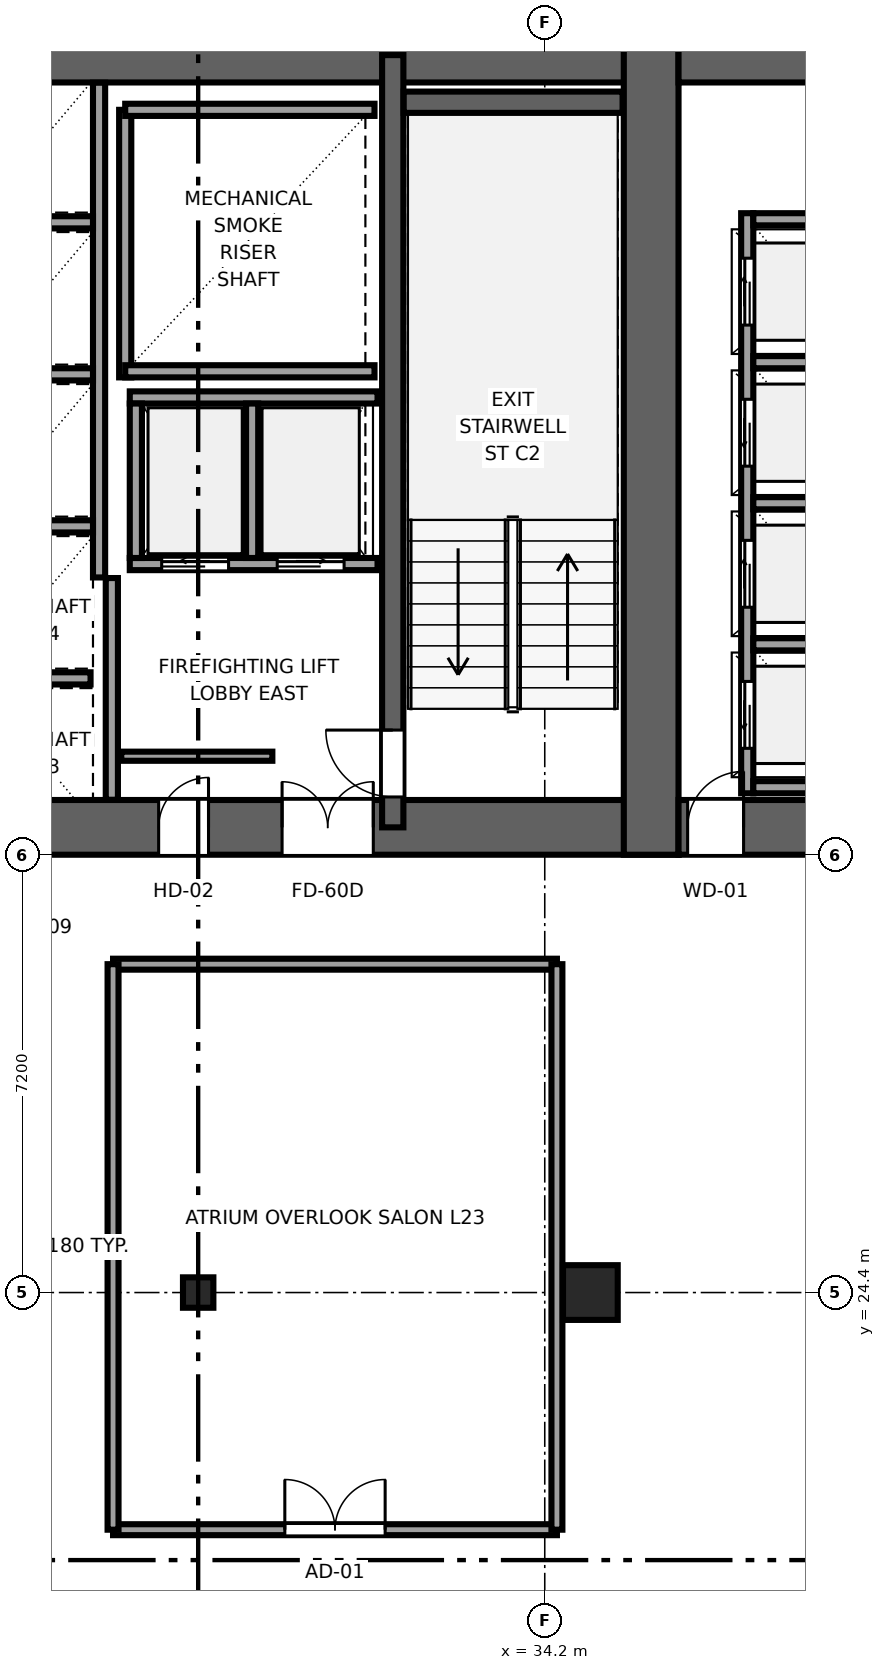
"""IFC4 building model, lengths in metres.
Left out: names, types, materials, properties, quantities, classifications, styles, units other than length and angle.
Written with IfcOpenShell. Run it as: python <this file> out.ifc"""

import sys

from ifc_helpers import new_model, si_unit, direction, frame, frame_2d, origin, origin_2d, place, context, subcontext, project, spatial, rectangle, i_section, extrude, source, transform, mapped, element, fill, save


model = new_model("IFC4")
c1 = context("Model", 3, precision=1e-05, world=origin(), true_north=direction((0.0, 1.0)))
c2 = subcontext(c1, "Body", "Model", "MODEL_VIEW")
j1 = project(units=[si_unit("LENGTHUNIT", "METRE"), si_unit("PLANEANGLEUNIT", "RADIAN")], contexts=[c1])
p1 = place(None, origin())
s1 = spatial("IfcSite", under=j1, at=p1, CompositionType="ELEMENT")
p2 = place(p1, origin())
s2 = spatial("IfcBuilding", under=s1, at=p2, CompositionType="ELEMENT")
p3 = place(p2, frame((0.0, 0.0, 92.35)))
s3 = spatial("IfcBuildingStorey", under=s2, at=p3, CompositionType="ELEMENT", Elevation=92.35)
p4 = place(p3, frame((9.6, 32.05, 0.0), z_axis=(0.0, 0.0, 1.0), x_axis=(1.0, 0.0, 0.0)))
e1 = element("IfcWall", 1, at=p4, inside=s3, PredefinedType="SHEAR", context=c2, shape_type="SweptSolid", body=[
    extrude(rectangle(XDim=26.8, YDim=0.9, at=frame_2d((13.4, 0.0))), origin(), (0.0, 0.0, 1.0), 3.55),
])
p5 = place(p4, frame((6.52, 0.0, 0.0), z_axis=(0.0, 0.0, 1.0), x_axis=(-1.0, 0.0, 0.0)))
e2 = element("IfcOpeningElement", 2, at=p5, cuts=e1, PredefinedType="OPENING", context=c2, shape_type="SweptSolid", body=[
    extrude(rectangle(XDim=1.5, YDim=2.04, at=frame_2d((0.75, 1.02))), frame((0.0, 0.46, 0.0), z_axis=(0.0, -1.0, 0.0), x_axis=(1.0, 0.0, 0.0)), (0.0, 0.0, 1.0), 0.92),
])
p6 = place(p4, frame((14.15, 0.0, 0.0), z_axis=(0.0, 0.0, 1.0), x_axis=(-1.0, 0.0, 0.0)))
e3 = element("IfcOpeningElement", 3, at=p6, cuts=e1, PredefinedType="OPENING", context=c2, shape_type="SweptSolid", body=[
    extrude(rectangle(XDim=1.5, YDim=2.04, at=frame_2d((0.75, 1.02))), frame((0.0, 0.46, 0.0), z_axis=(0.0, -1.0, 0.0), x_axis=(1.0, 0.0, 0.0)), (0.0, 0.0, 1.0), 0.92),
])
p7 = place(p4, frame((21.78, 0.0, 0.0), z_axis=(0.0, 0.0, 1.0), x_axis=(-1.0, 0.0, 0.0)))
e4 = element("IfcOpeningElement", 4, at=p7, cuts=e1, PredefinedType="OPENING", context=c2, shape_type="SweptSolid", body=[
    extrude(rectangle(XDim=1.5, YDim=2.04, at=frame_2d((0.75, 1.02))), frame((0.0, 0.46, 0.0), z_axis=(0.0, -1.0, 0.0), x_axis=(1.0, 0.0, 0.0)), (0.0, 0.0, 1.0), 0.92),
])
p8 = place(p4, frame((8.57, 0.0, 0.0), z_axis=(0.0, 0.0, 1.0), x_axis=(-1.0, 0.0, 0.0)))
e5 = element("IfcOpeningElement", 5, at=p8, cuts=e1, PredefinedType="OPENING", context=c2, shape_type="SweptSolid", body=[
    extrude(rectangle(XDim=0.82, YDim=2.01, at=frame_2d((0.41, 1.005))), frame((0.0, 0.46, 0.0), z_axis=(0.0, -1.0, 0.0), x_axis=(1.0, 0.0, 0.0)), (0.0, 0.0, 1.0), 0.92),
])
p9 = place(p4, frame((19.07, 0.0, 0.0), z_axis=(0.0, 0.0, 1.0), x_axis=(-1.0, 0.0, 0.0)))
e6 = element("IfcOpeningElement", 6, at=p9, cuts=e1, PredefinedType="OPENING", context=c2, shape_type="SweptSolid", body=[
    extrude(rectangle(XDim=0.82, YDim=2.01, at=frame_2d((0.41, 1.005))), frame((0.0, 0.46, 0.0), z_axis=(0.0, -1.0, 0.0), x_axis=(1.0, 0.0, 0.0)), (0.0, 0.0, 1.0), 0.92),
])
p10 = place(p3, frame((9.6, 44.75, 0.0), z_axis=(0.0, 0.0, 1.0), x_axis=(1.0, 0.0, 0.0)))
e7 = element("IfcWall", 7, at=p10, inside=s3, PredefinedType="SHEAR", context=c2, shape_type="SweptSolid", body=[
    extrude(rectangle(XDim=26.8, YDim=0.9, at=frame_2d((13.4, 0.0))), origin(), (0.0, 0.0, 1.0), 3.55),
])
p11 = place(p3, frame((35.95, 31.6, 0.0), z_axis=(0.0, 0.0, 1.0), x_axis=(0.0, 1.0, 0.0)))
e8 = element("IfcWall", 8, at=p11, inside=s3, PredefinedType="SHEAR", context=c2, shape_type="SweptSolid", body=[
    extrude(rectangle(XDim=13.6, YDim=0.9, at=frame_2d((6.8, 0.0))), origin(), (0.0, 0.0, 1.0), 3.55),
])
p12 = place(p3, frame((31.7, 32.05, 0.0), z_axis=(0.0, 0.0, 1.0), x_axis=(0.0, 1.0, 0.0)))
e9 = element("IfcWall", 9, at=p12, inside=s3, PredefinedType="SHEAR", context=c2, shape_type="SweptSolid", body=[
    extrude(rectangle(XDim=12.7, YDim=0.35, at=frame_2d((6.35, 0.0))), origin(), (0.0, 0.0, 1.0), 3.55),
])
p13 = place(p12, frame((1.6, 0.0, 0.0), z_axis=(0.0, 0.0, 1.0), x_axis=(-1.0, 0.0, 0.0)))
e10 = element("IfcOpeningElement", 10, at=p13, cuts=e9, PredefinedType="OPENING", context=c2, shape_type="SweptSolid", body=[
    extrude(rectangle(XDim=1.1, YDim=2.12, at=frame_2d((0.55, 1.06))), frame((0.0, 0.185, 0.0), z_axis=(0.0, -1.0, 0.0), x_axis=(1.0, 0.0, 0.0)), (0.0, 0.0, 1.0), 0.37),
])
p14 = place(p3, frame((36.4, 32.05, 0.0), z_axis=(0.0, 0.0, 1.0), x_axis=(1.0, 0.0, 0.0)))
e11 = element("IfcWall", 11, at=p14, inside=s3, PredefinedType="SHEAR", context=c2, shape_type="SweptSolid", body=[
    extrude(rectangle(XDim=4.0, YDim=0.9, at=frame_2d((2.0, 0.0))), origin(), (0.0, 0.0, 1.0), 3.55),
])
p15 = place(p14, frame((1.07, 0.0, 0.0), z_axis=(0.0, 0.0, 1.0), x_axis=(-1.0, 0.0, 0.0)))
e12 = element("IfcOpeningElement", 12, at=p15, cuts=e11, PredefinedType="OPENING", context=c2, shape_type="SweptSolid", body=[
    extrude(rectangle(XDim=0.92, YDim=2.01, at=frame_2d((0.46, 1.005))), frame((0.0, 0.46, 0.0), z_axis=(0.0, -1.0, 0.0), x_axis=(1.0, 0.0, 0.0)), (0.0, 0.0, 1.0), 0.92),
])
p16 = place(p3, frame((36.4, 44.75, 0.0), z_axis=(0.0, 0.0, 1.0), x_axis=(1.0, 0.0, 0.0)))
e13 = element("IfcWall", 13, at=p16, inside=s3, PredefinedType="SHEAR", context=c2, shape_type="SweptSolid", body=[
    extrude(rectangle(XDim=4.0, YDim=0.9, at=frame_2d((2.0, 0.0))), origin(), (0.0, 0.0, 1.0), 3.55),
])
p17 = place(p3, frame((31.88, 43.975, 0.0), z_axis=(0.0, 0.0, 1.0), x_axis=(1.0, 0.0, 0.0)))
e14 = element("IfcWall", 14, at=p17, inside=s3, PredefinedType="SHEAR", context=c2, shape_type="SweptSolid", body=[
    extrude(rectangle(XDim=3.6, YDim=0.35, at=frame_2d((1.8, 0.0))), origin(), (0.0, 0.0, 1.0), 3.55),
])
m1 = source(origin(), c2, "Body", "SweptSolid", [
    extrude(rectangle(XDim=0.9, YDim=0.9, at=origin_2d()), origin(), (0.0, 0.0, 1.0), 3.55),
])
p18 = place(p3, frame((34.95, 24.4, 0.0), z_axis=(0.0, 0.0, 1.0), x_axis=(1.0, 0.0, 0.0)))
e15 = element("IfcColumn", 15, at=p18, inside=s3, PredefinedType="COLUMN", context=c2, shape_type="MappedRepresentation", body=[
    mapped(m1, transform((0.0, 0.0, 0.0), x_axis=(1.0, 0.0, 0.0), y_axis=(0.0, 1.0, 0.0), z_axis=(0.0, 0.0, 1.0), scale=1.0)),
])
m2 = source(origin(), c2, "Body", "SweptSolid", [
    extrude(i_section(OverallWidth=0.5, OverallDepth=0.5, WebThickness=0.022, FlangeThickness=0.034, at=origin_2d()), origin(), (0.0, 0.0, 1.0), 3.55),
])
p19 = place(p3, frame((28.5, 24.4, 0.0), z_axis=(0.0, 0.0, 1.0), x_axis=(1.0, 0.0, 0.0)))
e16 = element("IfcColumn", 16, at=p19, inside=s3, PredefinedType="COLUMN", context=c2, shape_type="MappedRepresentation", body=[
    mapped(m2, transform((0.0, 0.0, 0.0), x_axis=(1.0, 0.0, 0.0), y_axis=(0.0, 1.0, 0.0), z_axis=(0.0, 0.0, 1.0), scale=1.0)),
])
p20 = place(p3, frame((27.3, 39.45, 0.0), z_axis=(0.0, 0.0, 1.0), x_axis=(0.0, 1.0, 0.0)))
e17 = element("IfcWall", 17, at=p20, inside=s3, PredefinedType="SOLIDWALL", context=c2, shape_type="SweptSolid", body=[
    extrude(rectangle(XDim=4.4, YDim=0.2, at=frame_2d((2.2, 0.0))), origin(), (0.0, 0.0, 1.0), 3.25),
])
for number, where, z_axis, x_axis in (
    (18, (27.3, 39.55, 0.0), (0.0, 0.0, 1.0), (1.0, 0.0, 0.0)),
    (19, (27.3, 43.85, 0.0), (0.0, 0.0, 1.0), (1.0, 0.0, 0.0)),
):
    element("IfcWall", number, at=place(p3, frame(where, z_axis=z_axis, x_axis=x_axis)), inside=s3, PredefinedType="SOLIDWALL", context=c2, shape_type="SweptSolid", body=[
        extrude(rectangle(XDim=4.1, YDim=0.2, at=frame_2d((2.05, 0.0))), origin(), (0.0, 0.0, 1.0), 3.25),
    ])
p21 = place(p3, frame((27.08, 32.504, 0.0), z_axis=(0.0, 0.0, 1.0), x_axis=(0.0, 1.0, 0.0)))
e20 = element("IfcWall", 20, at=p21, inside=s3, PredefinedType="SOLIDWALL", context=c2, shape_type="SweptSolid", body=[
    extrude(rectangle(XDim=3.646, YDim=0.2, at=frame_2d((1.823, 0.0))), origin(), (0.0, 0.0, 1.0), 3.25),
])
p22 = place(p3, frame((27.375, 36.38, 0.0), z_axis=(0.0, 0.0, 1.0), x_axis=(1.0, 0.0, 0.0)))
e21 = element("IfcWall", 21, at=p22, inside=s3, PredefinedType="SOLIDWALL", context=c2, shape_type="SweptSolid", body=[
    extrude(rectangle(XDim=4.075, YDim=0.2, at=frame_2d((2.038, 0.0))), origin(), (0.0, 0.0, 1.0), 3.25),
])
p23 = place(p22, frame((0.525, 0.0, 0.0)))
e22 = element("IfcOpeningElement", 22, at=p23, cuts=e21, PredefinedType="OPENING", context=c2, shape_type="SweptSolid", body=[
    extrude(rectangle(XDim=1.1, YDim=2.12, at=frame_2d((0.55, 1.06))), frame((0.0, 0.11, 0.0), z_axis=(0.0, -1.0, 0.0), x_axis=(1.0, 0.0, 0.0)), (0.0, 0.0, 1.0), 0.22),
])
p24 = place(p22, frame((2.425, 0.0, 0.0)))
e23 = element("IfcOpeningElement", 23, at=p24, cuts=e21, PredefinedType="OPENING", context=c2, shape_type="SweptSolid", body=[
    extrude(rectangle(XDim=1.1, YDim=2.12, at=frame_2d((0.55, 1.06))), frame((0.0, 0.11, 0.0), z_axis=(0.0, -1.0, 0.0), x_axis=(1.0, 0.0, 0.0)), (0.0, 0.0, 1.0), 0.22),
])
p25 = place(p3, frame((27.375, 39.12, 0.0), z_axis=(0.0, 0.0, 1.0), x_axis=(1.0, 0.0, 0.0)))
e24 = element("IfcWall", 24, at=p25, inside=s3, PredefinedType="SOLIDWALL", context=c2, shape_type="SweptSolid", body=[
    extrude(rectangle(XDim=4.075, YDim=0.2, at=frame_2d((2.038, 0.0))), origin(), (0.0, 0.0, 1.0), 3.25),
])
for number, where, z_axis, x_axis in (
    (25, (27.475, 36.48, 0.0), (0.0, 0.0, 1.0), (0.0, 1.0, 0.0)),
    (26, (29.387, 36.48, 0.0), (0.0, 0.0, 1.0), (0.0, 1.0, 0.0)),
):
    element("IfcWall", number, at=place(p3, frame(where, z_axis=z_axis, x_axis=x_axis)), inside=s3, PredefinedType="SOLIDWALL", context=c2, shape_type="SweptSolid", body=[
        extrude(rectangle(XDim=2.54, YDim=0.2, at=frame_2d((1.27, 0.0))), origin(), (0.0, 0.0, 1.0), 3.25),
    ])
p26 = place(p3, frame((26.87, 36.16, 0.0), z_axis=(0.0, 0.0, 1.0), x_axis=(0.0, 1.0, 0.0)))
e27 = element("IfcWall", 27, at=p26, inside=s3, PredefinedType="SOLIDWALL", context=c2, shape_type="SweptSolid", body=[
    extrude(rectangle(XDim=8.136, YDim=0.2, at=frame_2d((4.068, 0.0))), origin(), (0.0, 0.0, 1.0), 3.25),
])
p27 = place(p3, frame((24.93, 34.5, 0.0), z_axis=(0.0, 0.0, 1.0), x_axis=(1.0, 0.0, 0.0)))
e28 = element("IfcWall", 28, at=p27, inside=s3, PredefinedType="SOLIDWALL", context=c2, shape_type="SweptSolid", body=[
    extrude(rectangle(XDim=1.8, YDim=0.2, at=frame_2d((0.9, 0.0))), origin(), (0.0, 0.0, 1.0), 3.25),
])
for number, where, z_axis, x_axis in (
    (29, (24.93, 37.0, 0.0), (0.0, 0.0, 1.0), (1.0, 0.0, 0.0)),
    (30, (24.93, 39.5, 0.0), (0.0, 0.0, 1.0), (1.0, 0.0, 0.0)),
    (31, (24.93, 42.0, 0.0), (0.0, 0.0, 1.0), (1.0, 0.0, 0.0)),
):
    element("IfcWall", number, at=place(p3, frame(where, z_axis=z_axis, x_axis=x_axis)), inside=s3, PredefinedType="SOLIDWALL", context=c2, shape_type="SweptSolid", body=[
        extrude(rectangle(XDim=1.84, YDim=0.2, at=frame_2d((0.92, 0.0))), origin(), (0.0, 0.0, 1.0), 3.25),
    ])
p28 = place(p3, frame((37.53, 32.61, 0.0), z_axis=(0.0, 0.0, 1.0), x_axis=(0.0, 1.0, 0.0)))
e32 = element("IfcWall", 32, at=p28, inside=s3, PredefinedType="SOLIDWALL", context=c2, shape_type="SweptSolid", body=[
    extrude(rectangle(XDim=9.54, YDim=0.2, at=frame_2d((4.77, 0.0))), origin(), (0.0, 0.0, 1.0), 3.25),
])
p29 = place(p28, frame((0.74, 0.0, 0.0)))
e33 = element("IfcOpeningElement", 33, at=p29, cuts=e32, PredefinedType="OPENING", context=c2, shape_type="SweptSolid", body=[
    extrude(rectangle(XDim=1.1, YDim=2.12, at=frame_2d((0.55, 1.06))), frame((0.0, 0.11, 0.0), z_axis=(0.0, -1.0, 0.0), x_axis=(1.0, 0.0, 0.0)), (0.0, 0.0, 1.0), 0.22),
])
p30 = place(p28, frame((3.06, 0.0, 0.0)))
e34 = element("IfcOpeningElement", 34, at=p30, cuts=e32, PredefinedType="OPENING", context=c2, shape_type="SweptSolid", body=[
    extrude(rectangle(XDim=1.1, YDim=2.12, at=frame_2d((0.55, 1.06))), frame((0.0, 0.11, 0.0), z_axis=(0.0, -1.0, 0.0), x_axis=(1.0, 0.0, 0.0)), (0.0, 0.0, 1.0), 0.22),
])
p31 = place(p28, frame((5.38, 0.0, 0.0)))
e35 = element("IfcOpeningElement", 35, at=p31, cuts=e32, PredefinedType="OPENING", context=c2, shape_type="SweptSolid", body=[
    extrude(rectangle(XDim=1.1, YDim=2.12, at=frame_2d((0.55, 1.06))), frame((0.0, 0.11, 0.0), z_axis=(0.0, -1.0, 0.0), x_axis=(1.0, 0.0, 0.0)), (0.0, 0.0, 1.0), 0.22),
])
p32 = place(p28, frame((7.7, 0.0, 0.0)))
e36 = element("IfcOpeningElement", 36, at=p32, cuts=e32, PredefinedType="OPENING", context=c2, shape_type="SweptSolid", body=[
    extrude(rectangle(XDim=1.1, YDim=2.12, at=frame_2d((0.55, 1.06))), frame((0.0, 0.11, 0.0), z_axis=(0.0, -1.0, 0.0), x_axis=(1.0, 0.0, 0.0)), (0.0, 0.0, 1.0), 0.22),
])
for number, where, z_axis, x_axis in (
    (37, (37.63, 32.71, 0.0), (0.0, 0.0, 1.0), (1.0, 0.0, 0.0)),
    (38, (37.63, 42.05, 0.0), (0.0, 0.0, 1.0), (1.0, 0.0, 0.0)),
):
    element("IfcWall", number, at=place(p3, frame(where, z_axis=z_axis, x_axis=x_axis)), inside=s3, PredefinedType="SOLIDWALL", context=c2, shape_type="SweptSolid", body=[
        extrude(rectangle(XDim=1.87, YDim=0.2, at=frame_2d((0.935, 0.0))), origin(), (0.0, 0.0, 1.0), 3.25),
    ])
for number, where, z_axis, x_axis in (
    (39, (37.63, 35.06, 0.0), (0.0, 0.0, 1.0), (1.0, 0.0, 0.0)),
    (40, (37.63, 37.38, 0.0), (0.0, 0.0, 1.0), (1.0, 0.0, 0.0)),
    (41, (37.63, 39.7, 0.0), (0.0, 0.0, 1.0), (1.0, 0.0, 0.0)),
):
    element("IfcWall", number, at=place(p3, frame(where, z_axis=z_axis, x_axis=x_axis)), inside=s3, PredefinedType="SOLIDWALL", context=c2, shape_type="SweptSolid", body=[
        extrude(rectangle(XDim=1.8, YDim=0.2, at=frame_2d((0.9, 0.0))), origin(), (0.0, 0.0, 1.0), 3.25),
    ])
p33 = place(p3, frame((27.235, 33.22, 0.0), z_axis=(0.0, 0.0, 1.0), x_axis=(1.0, 0.0, 0.0)))
e42 = element("IfcWall", 42, at=p33, inside=s3, PredefinedType="PARTITIONING", context=c2, shape_type="SweptSolid", body=[
    extrude(rectangle(XDim=2.485, YDim=0.15, at=frame_2d((1.242, 0.0))), origin(), (0.0, 0.0, 1.0), 3.25),
])
p34 = place(p3, frame((27.1, 20.5, 0.0), z_axis=(0.0, 0.0, 1.0), x_axis=(1.0, 0.0, 0.0)))
e43 = element("IfcWall", 43, at=p34, inside=s3, PredefinedType="PARTITIONING", context=c2, shape_type="SweptSolid", body=[
    extrude(rectangle(XDim=7.3, YDim=0.18, at=frame_2d((3.65, 0.0))), origin(), (0.0, 0.0, 1.0), 3.25),
])
p35 = place(p34, frame((2.825, 0.0, 0.0)))
e44 = element("IfcOpeningElement", 44, at=p35, cuts=e43, PredefinedType="OPENING", context=c2, shape_type="SweptSolid", body=[
    extrude(rectangle(XDim=1.65, YDim=2.15, at=frame_2d((0.825, 1.075))), frame((0.0, 0.1, 0.0), z_axis=(0.0, -1.0, 0.0), x_axis=(1.0, 0.0, 0.0)), (0.0, 0.0, 1.0), 0.2),
])
p36 = place(p3, frame((27.1, 29.8, 0.0), z_axis=(0.0, 0.0, 1.0), x_axis=(1.0, 0.0, 0.0)))
e45 = element("IfcWall", 45, at=p36, inside=s3, PredefinedType="PARTITIONING", context=c2, shape_type="SweptSolid", body=[
    extrude(rectangle(XDim=7.3, YDim=0.18, at=frame_2d((3.65, 0.0))), origin(), (0.0, 0.0, 1.0), 3.25),
])
for number, where, z_axis, x_axis in (
    (46, (27.1, 20.5, 0.0), (0.0, 0.0, 1.0), (0.0, 1.0, 0.0)),
    (47, (34.4, 20.5, 0.0), (0.0, 0.0, 1.0), (0.0, 1.0, 0.0)),
):
    element("IfcWall", number, at=place(p3, frame(where, z_axis=z_axis, x_axis=x_axis)), inside=s3, PredefinedType="PARTITIONING", context=c2, shape_type="SweptSolid", body=[
        extrude(rectangle(XDim=9.3, YDim=0.18, at=frame_2d((4.65, 0.0))), origin(), (0.0, 0.0, 1.0), 3.25),
    ])
m3 = source(origin(), c2, "Body", "SweptSolid", [
    extrude(rectangle(XDim=1.1, YDim=2.12, at=frame_2d((0.55, 1.06))), frame((0.0, 0.025, 0.0), z_axis=(0.0, -1.0, 0.0), x_axis=(1.0, 0.0, 0.0)), (0.0, 0.0, 1.0), 0.05),
])
p37 = place(p13, origin())
e48 = element("IfcDoor", 48, at=p37, inside=s3, OperationType="SINGLE_SWING_RIGHT", PredefinedType="DOOR", context=c2, shape_type="MappedRepresentation", body=[
    mapped(m3, transform((0.0, 0.0, 0.0), x_axis=(1.0, 0.0, 0.0), y_axis=(0.0, 1.0, 0.0), z_axis=(0.0, 0.0, 1.0), scale=1.0)),
])
fill(e10, e48)
m4 = source(origin(), c2, "Body", "SweptSolid", [
    extrude(rectangle(XDim=1.5, YDim=2.04, at=frame_2d((0.75, 1.02))), frame((0.0, 0.025, 0.0), z_axis=(0.0, -1.0, 0.0), x_axis=(1.0, 0.0, 0.0)), (0.0, 0.0, 1.0), 0.05),
])
p38 = place(p7, origin())
e49 = element("IfcDoor", 49, at=p38, inside=s3, OperationType="DOUBLE_DOOR_SINGLE_SWING", PredefinedType="DOOR", context=c2, shape_type="MappedRepresentation", body=[
    mapped(m4, transform((0.0, 0.0, 0.0), x_axis=(1.0, 0.0, 0.0), y_axis=(0.0, 1.0, 0.0), z_axis=(0.0, 0.0, 1.0), scale=1.0)),
])
fill(e4, e49)
m5 = source(origin(), c2, "Body", "SweptSolid", [
    extrude(rectangle(XDim=0.82, YDim=2.01, at=frame_2d((0.41, 1.005))), frame((0.0, 0.025, 0.0), z_axis=(0.0, -1.0, 0.0), x_axis=(1.0, 0.0, 0.0)), (0.0, 0.0, 1.0), 0.05),
])
p39 = place(p9, origin())
e50 = element("IfcDoor", 50, at=p39, inside=s3, OperationType="SINGLE_SWING_RIGHT", PredefinedType="DOOR", context=c2, shape_type="MappedRepresentation", body=[
    mapped(m5, transform((0.0, 0.0, 0.0), x_axis=(1.0, 0.0, 0.0), y_axis=(0.0, 1.0, 0.0), z_axis=(0.0, 0.0, 1.0), scale=1.0)),
])
fill(e6, e50)
m6 = source(origin(), c2, "Body", "SweptSolid", [
    extrude(rectangle(XDim=0.92, YDim=2.01, at=frame_2d((0.46, 1.005))), frame((0.0, 0.025, 0.0), z_axis=(0.0, -1.0, 0.0), x_axis=(1.0, 0.0, 0.0)), (0.0, 0.0, 1.0), 0.05),
])
p40 = place(p15, origin())
e51 = element("IfcDoor", 51, at=p40, inside=s3, OperationType="SINGLE_SWING_RIGHT", PredefinedType="DOOR", context=c2, shape_type="MappedRepresentation", body=[
    mapped(m6, transform((0.0, 0.0, 0.0), x_axis=(1.0, 0.0, 0.0), y_axis=(0.0, 1.0, 0.0), z_axis=(0.0, 0.0, 1.0), scale=1.0)),
])
fill(e12, e51)
m7 = source(origin(), c2, "Body", "SweptSolid", [
    extrude(rectangle(XDim=1.1, YDim=2.12, at=frame_2d((0.55, 1.06))), frame((0.0, 0.025, 0.0), z_axis=(0.0, -1.0, 0.0), x_axis=(1.0, 0.0, 0.0)), (0.0, 0.0, 1.0), 0.05),
])
p41 = place(p23, origin())
e52 = element("IfcDoor", 52, at=p41, inside=s3, OperationType="SLIDING_TO_LEFT", PredefinedType="DOOR", context=c2, shape_type="MappedRepresentation", body=[
    mapped(m7, transform((0.0, 0.0, 0.0), x_axis=(1.0, 0.0, 0.0), y_axis=(0.0, 1.0, 0.0), z_axis=(0.0, 0.0, 1.0), scale=1.0)),
])
fill(e22, e52)
p42 = place(p24, origin())
e53 = element("IfcDoor", 53, at=p42, inside=s3, OperationType="SLIDING_TO_RIGHT", PredefinedType="DOOR", context=c2, shape_type="MappedRepresentation", body=[
    mapped(m7, transform((0.0, 0.0, 0.0), x_axis=(1.0, 0.0, 0.0), y_axis=(0.0, 1.0, 0.0), z_axis=(0.0, 0.0, 1.0), scale=1.0)),
])
fill(e23, e53)
p43 = place(p29, origin())
e54 = element("IfcDoor", 54, at=p43, inside=s3, OperationType="SLIDING_TO_LEFT", PredefinedType="DOOR", context=c2, shape_type="MappedRepresentation", body=[
    mapped(m7, transform((0.0, 0.0, 0.0), x_axis=(1.0, 0.0, 0.0), y_axis=(0.0, 1.0, 0.0), z_axis=(0.0, 0.0, 1.0), scale=1.0)),
])
fill(e33, e54)
p44 = place(p30, origin())
e55 = element("IfcDoor", 55, at=p44, inside=s3, OperationType="SLIDING_TO_RIGHT", PredefinedType="DOOR", context=c2, shape_type="MappedRepresentation", body=[
    mapped(m7, transform((0.0, 0.0, 0.0), x_axis=(1.0, 0.0, 0.0), y_axis=(0.0, 1.0, 0.0), z_axis=(0.0, 0.0, 1.0), scale=1.0)),
])
fill(e34, e55)
p45 = place(p31, origin())
e56 = element("IfcDoor", 56, at=p45, inside=s3, OperationType="SLIDING_TO_LEFT", PredefinedType="DOOR", context=c2, shape_type="MappedRepresentation", body=[
    mapped(m7, transform((0.0, 0.0, 0.0), x_axis=(1.0, 0.0, 0.0), y_axis=(0.0, 1.0, 0.0), z_axis=(0.0, 0.0, 1.0), scale=1.0)),
])
fill(e35, e56)
p46 = place(p32, origin())
e57 = element("IfcDoor", 57, at=p46, inside=s3, OperationType="SLIDING_TO_RIGHT", PredefinedType="DOOR", context=c2, shape_type="MappedRepresentation", body=[
    mapped(m7, transform((0.0, 0.0, 0.0), x_axis=(1.0, 0.0, 0.0), y_axis=(0.0, 1.0, 0.0), z_axis=(0.0, 0.0, 1.0), scale=1.0)),
])
fill(e36, e57)
m8 = source(origin(), c2, "Body", "SweptSolid", [
    extrude(rectangle(XDim=1.65, YDim=2.15, at=frame_2d((0.825, 1.075))), frame((0.0, 0.025, 0.0), z_axis=(0.0, -1.0, 0.0), x_axis=(1.0, 0.0, 0.0)), (0.0, 0.0, 1.0), 0.05),
])
p47 = place(p35, origin())
e58 = element("IfcDoor", 58, at=p47, inside=s3, OperationType="DOUBLE_DOOR_SINGLE_SWING", PredefinedType="DOOR", context=c2, shape_type="MappedRepresentation", body=[
    mapped(m8, transform((0.0, 0.0, 0.0), x_axis=(1.0, 0.0, 0.0), y_axis=(0.0, 1.0, 0.0), z_axis=(0.0, 0.0, 1.0), scale=1.0)),
])
fill(e44, e58)
save(model, sys.argv[1])
